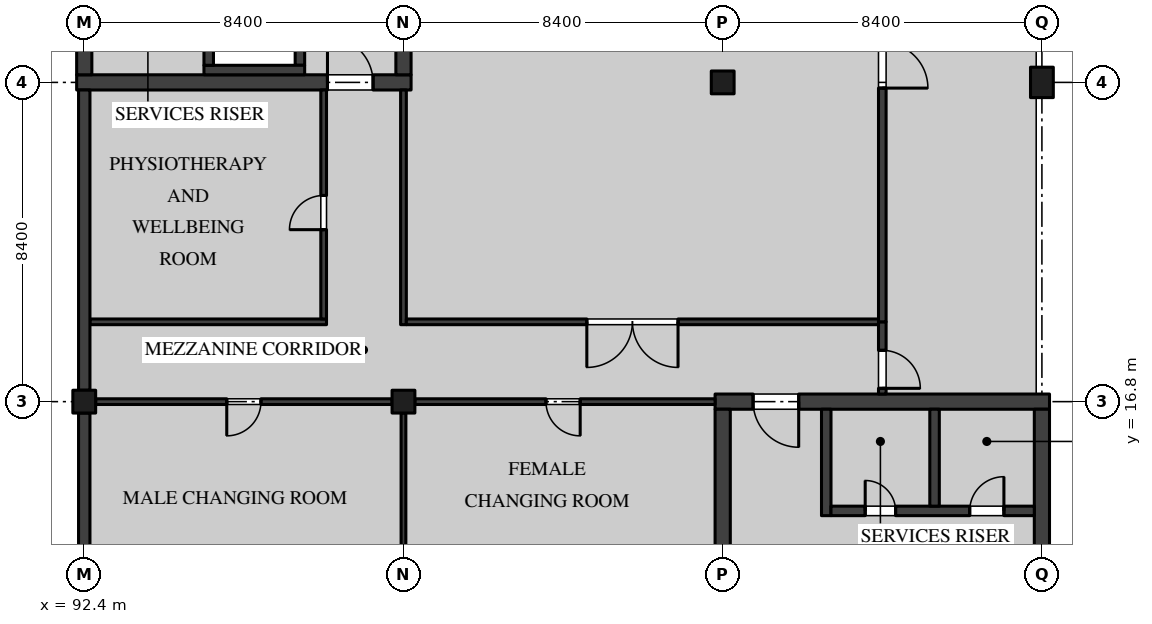
"""IFC4 building model, lengths in metres.
Left out: names, types, materials, properties, quantities, classifications, styles, units other than length and angle.
Written with IfcOpenShell. Run it as: python <this file> out.ifc"""

import sys

from ifc_helpers import new_model, si_unit, direction, frame, frame_2d, origin, origin_2d, place, context, subcontext, project, spatial, rectangle, extrude, element, fill, save


model = new_model("IFC4")
c1 = context("Model", 3, precision=1e-05, world=origin(), true_north=direction((0.0, 1.0)))
c2 = subcontext(c1, "Body", "Model", "MODEL_VIEW")
j1 = project(units=[si_unit("LENGTHUNIT", "METRE"), si_unit("PLANEANGLEUNIT", "RADIAN")], contexts=[c1])
p1 = place(None, origin())
s1 = spatial("IfcSite", under=j1, at=p1, CompositionType="ELEMENT")
p2 = place(p1, origin())
s2 = spatial("IfcBuilding", under=s1, at=p2, CompositionType="ELEMENT")
p3 = place(p2, frame((0.0, 0.0, 5.4)))
s3 = spatial("IfcBuildingStorey", under=s2, at=p3, CompositionType="ELEMENT", Elevation=5.4)
for number, where, z_axis, x_axis in (
    (1, (92.4, 16.8, 0.0), (0.0, 0.0, 1.0), (1.0, 0.0, 0.0)),
    (2, (100.8, 16.8, 0.0), (0.0, 0.0, 1.0), (1.0, 0.0, 0.0)),
    (3, (109.2, 25.2, 0.0), (0.0, 0.0, 1.0), (1.0, 0.0, 0.0)),
):
    element("IfcColumn", number, at=place(p3, frame(where, z_axis=z_axis, x_axis=x_axis)), inside=s3, PredefinedType="COLUMN", context=c2, shape_type="SweptSolid", body=[
        extrude(rectangle(XDim=0.6, YDim=0.6, at=origin_2d()), origin(), (0.0, 0.0, 1.0), 3.0),
    ])
p4 = place(p3, frame((117.6, 25.2, 0.0), z_axis=(0.0, 0.0, 1.0), x_axis=(1.0, 0.0, 0.0)))
e4 = element("IfcColumn", 4, at=p4, inside=s3, PredefinedType="COLUMN", context=c2, shape_type="SweptSolid", body=[
    extrude(rectangle(XDim=0.6, YDim=0.8, at=origin_2d()), origin(), (0.0, 0.0, 1.0), 3.0),
])
p5 = place(p3, frame((92.2, 25.2, 0.0), z_axis=(0.0, 0.0, 1.0), x_axis=(1.0, 0.0, 0.0)))
e5 = element("IfcWall", 5, at=p5, inside=s3, PredefinedType="SHEAR", context=c2, shape_type="SweptSolid", body=[
    extrude(rectangle(XDim=8.8, YDim=0.4, at=frame_2d((4.4, 0.0))), origin(), (0.0, 0.0, 1.0), 3.0),
])
p6 = place(p5, frame((6.6, 0.0, 0.0)))
e6 = element("IfcOpeningElement", 6, at=p6, cuts=e5, PredefinedType="OPENING", context=c2, shape_type="SweptSolid", body=[
    extrude(rectangle(XDim=1.2, YDim=2.1, at=frame_2d((0.6, 1.05))), frame((0.0, 0.21, 0.0), z_axis=(0.0, -1.0, 0.0), x_axis=(1.0, 0.0, 0.0)), (0.0, 0.0, 1.0), 0.42),
])
for number, where, z_axis, x_axis in (
    (7, (92.4, 25.4, 0.0), (0.0, 0.0, 1.0), (0.0, 1.0, 0.0)),
    (8, (100.8, 25.4, 0.0), (0.0, 0.0, 1.0), (0.0, 1.0, 0.0)),
):
    element("IfcWall", number, at=place(p3, frame(where, z_axis=z_axis, x_axis=x_axis)), inside=s3, PredefinedType="SHEAR", context=c2, shape_type="SweptSolid", body=[
        extrude(rectangle(XDim=8.0, YDim=0.4, at=frame_2d((4.0, 0.0))), origin(), (0.0, 0.0, 1.0), 3.0),
    ])
p7 = place(p3, frame((109.0, 16.8, 0.0), z_axis=(0.0, 0.0, 1.0), x_axis=(1.0, 0.0, 0.0)))
e9 = element("IfcWall", 9, at=p7, inside=s3, PredefinedType="SHEAR", context=c2, shape_type="SweptSolid", body=[
    extrude(rectangle(XDim=8.8, YDim=0.4, at=frame_2d((4.4, 0.0))), origin(), (0.0, 0.0, 1.0), 3.0),
])
p8 = place(p7, frame((1.0, 0.0, 0.0)))
e10 = element("IfcOpeningElement", 10, at=p8, cuts=e9, PredefinedType="OPENING", context=c2, shape_type="SweptSolid", body=[
    extrude(rectangle(XDim=1.2, YDim=2.1, at=frame_2d((0.6, 1.05))), frame((0.0, 0.21, 0.0), z_axis=(0.0, -1.0, 0.0), x_axis=(1.0, 0.0, 0.0)), (0.0, 0.0, 1.0), 0.42),
])
for number, where, z_axis, x_axis in (
    (11, (109.2, 8.6, 0.0), (0.0, 0.0, 1.0), (0.0, 1.0, 0.0)),
    (12, (117.6, 8.6, 0.0), (0.0, 0.0, 1.0), (0.0, 1.0, 0.0)),
):
    element("IfcWall", number, at=place(p3, frame(where, z_axis=z_axis, x_axis=x_axis)), inside=s3, PredefinedType="SHEAR", context=c2, shape_type="SweptSolid", body=[
        extrude(rectangle(XDim=8.0, YDim=0.4, at=frame_2d((4.0, 0.0))), origin(), (0.0, 0.0, 1.0), 3.0),
    ])
p9 = place(p3, frame((111.925, 13.8, 0.0), z_axis=(0.0, 0.0, 1.0), x_axis=(0.0, 1.0, 0.0)))
e13 = element("IfcWall", 13, at=p9, inside=s3, PredefinedType="SOLIDWALL", context=c2, shape_type="SweptSolid", body=[
    extrude(rectangle(XDim=2.8, YDim=0.25, at=frame_2d((1.4, 0.0))), origin(), (0.0, 0.0, 1.0), 3.0),
])
p10 = place(p3, frame((112.05, 13.925, 0.0), z_axis=(0.0, 0.0, 1.0), x_axis=(1.0, 0.0, 0.0)))
e14 = element("IfcWall", 14, at=p10, inside=s3, PredefinedType="SOLIDWALL", context=c2, shape_type="SweptSolid", body=[
    extrude(rectangle(XDim=5.35, YDim=0.25, at=frame_2d((2.675, 0.0))), origin(), (0.0, 0.0, 1.0), 3.0),
])
p11 = place(p10, frame((3.65, 0.0, 0.0)))
e15 = element("IfcOpeningElement", 15, at=p11, cuts=e14, PredefinedType="OPENING", context=c2, shape_type="SweptSolid", body=[
    extrude(rectangle(XDim=0.9, YDim=2.1, at=frame_2d((0.45, 1.05))), frame((0.0, 0.135, 0.0), z_axis=(0.0, -1.0, 0.0), x_axis=(1.0, 0.0, 0.0)), (0.0, 0.0, 1.0), 0.27),
])
p12 = place(p10, frame((0.9, 0.0, 0.0)))
e16 = element("IfcOpeningElement", 16, at=p12, cuts=e14, PredefinedType="OPENING", context=c2, shape_type="SweptSolid", body=[
    extrude(rectangle(XDim=0.8, YDim=2.1, at=frame_2d((0.4, 1.05))), frame((0.0, 0.135, 0.0), z_axis=(0.0, -1.0, 0.0), x_axis=(1.0, 0.0, 0.0)), (0.0, 0.0, 1.0), 0.27),
])
p13 = place(p3, frame((114.775, 14.05, 0.0), z_axis=(0.0, 0.0, 1.0), x_axis=(0.0, 1.0, 0.0)))
e17 = element("IfcWall", 17, at=p13, inside=s3, PredefinedType="SOLIDWALL", context=c2, shape_type="SweptSolid", body=[
    extrude(rectangle(XDim=2.55, YDim=0.25, at=frame_2d((1.275, 0.0))), origin(), (0.0, 0.0, 1.0), 3.0),
])
p14 = place(p3, frame((98.075, 25.65, 0.0), z_axis=(0.0, 0.0, 1.0), x_axis=(0.0, 1.0, 0.0)))
e18 = element("IfcWall", 18, at=p14, inside=s3, PredefinedType="SOLIDWALL", context=c2, shape_type="SweptSolid", body=[
    extrude(rectangle(XDim=2.3, YDim=0.25, at=frame_2d((1.15, 0.0))), origin(), (0.0, 0.0, 1.0), 3.0),
])
p15 = place(p3, frame((95.55, 25.525, 0.0), z_axis=(0.0, 0.0, 1.0), x_axis=(1.0, 0.0, 0.0)))
e19 = element("IfcWall", 19, at=p15, inside=s3, PredefinedType="SOLIDWALL", context=c2, shape_type="SweptSolid", body=[
    extrude(rectangle(XDim=2.65, YDim=0.25, at=frame_2d((1.325, 0.0))), origin(), (0.0, 0.0, 1.0), 3.0),
])
p16 = place(p3, frame((95.675, 25.65, 0.0), z_axis=(0.0, 0.0, 1.0), x_axis=(0.0, 1.0, 0.0)))
e20 = element("IfcWall", 20, at=p16, inside=s3, PredefinedType="SOLIDWALL", context=c2, shape_type="SweptSolid", body=[
    extrude(rectangle(XDim=2.3, YDim=0.25, at=frame_2d((1.15, 0.0))), origin(), (0.0, 0.0, 1.0), 3.0),
])
p17 = place(p2, origin())
s4 = spatial("IfcBuildingStorey", under=s2, at=p17, CompositionType="ELEMENT", Elevation=0.0)
p18 = place(p17, frame((117.6, 17.0, 0.0), z_axis=(0.0, 0.0, 1.0), x_axis=(0.0, 1.0, 0.0)))
e21 = element("IfcWall", 21, at=p18, inside=s4, PredefinedType="PARTITIONING", context=c2, shape_type="SweptSolid", body=[
    extrude(rectangle(XDim=1.9, YDim=0.15, at=frame_2d((0.95, 0.0))), origin(), (0.0, 0.0, 1.0), 8.375),
])
p19 = place(p18, frame((0.45, 0.0, 0.0)))
e22 = element("IfcOpeningElement", 22, at=p19, cuts=e21, PredefinedType="OPENING", context=c2, shape_type="SweptSolid", body=[
    extrude(rectangle(XDim=1.0, YDim=2.1, at=frame_2d((0.5, 1.05))), frame((0.0, 0.085, 0.0), z_axis=(0.0, -1.0, 0.0), x_axis=(1.0, 0.0, 0.0)), (0.0, 0.0, 1.0), 0.17),
])
p20 = place(p17, frame((117.6, 18.9, 0.0), z_axis=(0.0, 0.0, 1.0), x_axis=(0.0, 1.0, 0.0)))
e23 = element("IfcWall", 23, at=p20, inside=s4, PredefinedType="PARTITIONING", context=c2, shape_type="SweptSolid", body=[
    extrude(rectangle(XDim=5.85, YDim=0.25, at=frame_2d((2.925, 0.0))), origin(), (0.0, 0.0, 1.0), 8.375),
])
p21 = place(p17, frame((117.6, 25.65, 0.0), z_axis=(0.0, 0.0, 1.0), x_axis=(0.0, 1.0, 0.0)))
e24 = element("IfcWall", 24, at=p21, inside=s4, PredefinedType="PARTITIONING", context=c2, shape_type="SweptSolid", body=[
    extrude(rectangle(XDim=7.75, YDim=0.25, at=frame_2d((3.875, 0.0))), origin(), (0.0, 0.0, 1.0), 8.375),
])
p22 = place(p3, frame((113.4, 17.0, 0.0), z_axis=(0.0, 0.0, 1.0), x_axis=(0.0, 1.0, 0.0)))
e25 = element("IfcWall", 25, at=p22, inside=s3, PredefinedType="PARTITIONING", context=c2, shape_type="SweptSolid", body=[
    extrude(rectangle(XDim=1.9, YDim=0.2, at=frame_2d((0.95, 0.0))), origin(), (0.0, 0.0, 1.0), 4.37),
])
p23 = place(p22, frame((0.15, 0.0, 0.0)))
e26 = element("IfcOpeningElement", 26, at=p23, cuts=e25, PredefinedType="OPENING", context=c2, shape_type="SweptSolid", body=[
    extrude(rectangle(XDim=1.0, YDim=2.4, at=frame_2d((0.5, 1.2))), frame((0.0, 0.11, 0.0), z_axis=(0.0, -1.0, 0.0), x_axis=(1.0, 0.0, 0.0)), (0.0, 0.0, 1.0), 0.22),
])
p24 = place(p3, frame((113.4, 18.9, 0.0), z_axis=(0.0, 0.0, 1.0), x_axis=(0.0, 1.0, 0.0)))
e27 = element("IfcWall", 27, at=p24, inside=s3, PredefinedType="PARTITIONING", context=c2, shape_type="SweptSolid", body=[
    extrude(rectangle(XDim=14.5, YDim=0.2, at=frame_2d((7.25, 0.0))), origin(), (0.0, 0.0, 1.0), 4.37),
])
p25 = place(p24, frame((6.15, 0.0, 0.0)))
e28 = element("IfcOpeningElement", 28, at=p25, cuts=e27, PredefinedType="OPENING", context=c2, shape_type="SweptSolid", body=[
    extrude(rectangle(XDim=2.4, YDim=2.7, at=frame_2d((1.2, 1.35))), frame((0.0, 0.11, 0.0), z_axis=(0.0, -1.0, 0.0), x_axis=(1.0, 0.0, 0.0)), (0.0, 0.0, 1.0), 0.22),
])
p26 = place(p3, frame((100.8, 18.825, 0.0), z_axis=(0.0, 0.0, 1.0), x_axis=(0.0, 1.0, 0.0)))
e29 = element("IfcWall", 29, at=p26, inside=s3, PredefinedType="PARTITIONING", context=c2, shape_type="SweptSolid", body=[
    extrude(rectangle(XDim=6.175, YDim=0.15, at=frame_2d((3.087, 0.0))), origin(), (0.0, 0.0, 1.0), 2.975),
])
p27 = place(p3, frame((100.875, 18.9, 0.0), z_axis=(0.0, 0.0, 1.0), x_axis=(1.0, 0.0, 0.0)))
e30 = element("IfcWall", 30, at=p27, inside=s3, PredefinedType="PARTITIONING", context=c2, shape_type="SweptSolid", body=[
    extrude(rectangle(XDim=12.425, YDim=0.15, at=frame_2d((6.212, 0.0))), origin(), (0.0, 0.0, 1.0), 4.37),
])
p28 = place(p27, frame((4.75, 0.0, 0.0)))
e31 = element("IfcOpeningElement", 31, at=p28, cuts=e30, PredefinedType="OPENING", context=c2, shape_type="SweptSolid", body=[
    extrude(rectangle(XDim=2.4, YDim=2.7, at=frame_2d((1.2, 1.35))), frame((0.0, 0.085, 0.0), z_axis=(0.0, -1.0, 0.0), x_axis=(1.0, 0.0, 0.0)), (0.0, 0.0, 1.0), 0.17),
])
p29 = place(p3, frame((101.1, 16.8, 0.0), z_axis=(0.0, 0.0, 1.0), x_axis=(1.0, 0.0, 0.0)))
e32 = element("IfcWall", 32, at=p29, inside=s3, PredefinedType="PARTITIONING", context=c2, shape_type="SweptSolid", body=[
    extrude(rectangle(XDim=7.9, YDim=0.15, at=frame_2d((3.95, 0.0))), origin(), (0.0, 0.0, 1.0), 4.37),
])
p30 = place(p29, frame((3.45, 0.0, 0.0)))
e33 = element("IfcOpeningElement", 33, at=p30, cuts=e32, PredefinedType="OPENING", context=c2, shape_type="SweptSolid", body=[
    extrude(rectangle(XDim=0.9, YDim=2.1, at=frame_2d((0.45, 1.05))), frame((0.0, 0.085, 0.0), z_axis=(0.0, -1.0, 0.0), x_axis=(1.0, 0.0, 0.0)), (0.0, 0.0, 1.0), 0.17),
])
p31 = place(p3, frame((92.7, 16.8, 0.0), z_axis=(0.0, 0.0, 1.0), x_axis=(1.0, 0.0, 0.0)))
e34 = element("IfcWall", 34, at=p31, inside=s3, PredefinedType="PARTITIONING", context=c2, shape_type="SweptSolid", body=[
    extrude(rectangle(XDim=7.8, YDim=0.15, at=frame_2d((3.9, 0.0))), origin(), (0.0, 0.0, 1.0), 4.37),
])
p32 = place(p31, frame((3.45, 0.0, 0.0)))
e35 = element("IfcOpeningElement", 35, at=p32, cuts=e34, PredefinedType="OPENING", context=c2, shape_type="SweptSolid", body=[
    extrude(rectangle(XDim=0.9, YDim=2.1, at=frame_2d((0.45, 1.05))), frame((0.0, 0.085, 0.0), z_axis=(0.0, -1.0, 0.0), x_axis=(1.0, 0.0, 0.0)), (0.0, 0.0, 1.0), 0.17),
])
p33 = place(p3, frame((92.55, 18.9, 0.0), z_axis=(0.0, 0.0, 1.0), x_axis=(1.0, 0.0, 0.0)))
e36 = element("IfcWall", 36, at=p33, inside=s3, PredefinedType="PARTITIONING", context=c2, shape_type="SweptSolid", body=[
    extrude(rectangle(XDim=6.225, YDim=0.15, at=frame_2d((3.112, 0.0))), origin(), (0.0, 0.0, 1.0), 4.37),
])
p34 = place(p3, frame((98.7, 18.975, 0.0), z_axis=(0.0, 0.0, 1.0), x_axis=(0.0, 1.0, 0.0)))
e37 = element("IfcWall", 37, at=p34, inside=s3, PredefinedType="PARTITIONING", context=c2, shape_type="SweptSolid", body=[
    extrude(rectangle(XDim=6.025, YDim=0.15, at=frame_2d((3.012, 0.0))), origin(), (0.0, 0.0, 1.0), 4.37),
])
p35 = place(p34, frame((2.35, 0.0, 0.0)))
e38 = element("IfcOpeningElement", 38, at=p35, cuts=e37, PredefinedType="OPENING", context=c2, shape_type="SweptSolid", body=[
    extrude(rectangle(XDim=0.9, YDim=2.1, at=frame_2d((0.45, 1.05))), frame((0.0, 0.085, 0.0), z_axis=(0.0, -1.0, 0.0), x_axis=(1.0, 0.0, 0.0)), (0.0, 0.0, 1.0), 0.17),
])
p36 = place(p3, frame((100.8, 12.662, 0.0), z_axis=(0.0, 0.0, 1.0), x_axis=(0.0, 1.0, 0.0)))
e39 = element("IfcWall", 39, at=p36, inside=s3, PredefinedType="PARTITIONING", context=c2, shape_type="SweptSolid", body=[
    extrude(rectangle(XDim=3.838, YDim=0.125, at=frame_2d((1.919, 0.0))), origin(), (0.0, 0.0, 1.0), 2.975),
])
p37 = place(p3, frame((92.4, 17.1, 3.0), z_axis=(0.0, 0.0, 1.0), x_axis=(0.0, -1.0, 0.0)))
e40 = element("IfcWall", 40, at=p37, inside=s3, PredefinedType="SOLIDWALL", context=c2, shape_type="SweptSolid", body=[
    extrude(rectangle(XDim=0.6, YDim=0.3, at=frame_2d((0.3, 0.0))), origin(), (0.0, 0.0, 1.0), 1.5),
])
p38 = place(p3, frame((92.4, 25.0, 0.0), z_axis=(0.0, 0.0, 1.0), x_axis=(0.0, -1.0, 0.0)))
e41 = element("IfcWall", 41, at=p38, inside=s3, PredefinedType="SOLIDWALL", context=c2, shape_type="SweptSolid", body=[
    extrude(rectangle(XDim=7.9, YDim=0.3, at=frame_2d((3.95, 0.0))), origin(), (0.0, 0.0, 1.0), 2.975),
])
p39 = place(p3, frame((92.4, 16.5, 0.0), z_axis=(0.0, 0.0, 1.0), x_axis=(0.0, -1.0, 0.0)))
e42 = element("IfcWall", 42, at=p39, inside=s3, PredefinedType="SOLIDWALL", context=c2, shape_type="SweptSolid", body=[
    extrude(rectangle(XDim=7.8, YDim=0.3, at=frame_2d((3.9, 0.0))), origin(), (0.0, 0.0, 1.0), 2.975),
])
p40 = place(p6, origin())
e43 = element("IfcDoor", 43, at=p40, inside=s3, OperationType="SINGLE_SWING_RIGHT", PredefinedType="DOOR", context=c2, shape_type="SweptSolid", body=[
    extrude(rectangle(XDim=1.2, YDim=2.1, at=frame_2d((0.6, 1.05))), frame((0.0, 0.035, 0.0), z_axis=(0.0, -1.0, 0.0), x_axis=(1.0, 0.0, 0.0)), (0.0, 0.0, 1.0), 0.07),
])
fill(e6, e43)
p41 = place(p11, origin())
e44 = element("IfcDoor", 44, at=p41, inside=s3, OperationType="SINGLE_SWING_LEFT", PredefinedType="DOOR", context=c2, shape_type="SweptSolid", body=[
    extrude(rectangle(XDim=0.9, YDim=2.1, at=frame_2d((0.45, 1.05))), frame((0.0, 0.035, 0.0), z_axis=(0.0, -1.0, 0.0), x_axis=(1.0, 0.0, 0.0)), (0.0, 0.0, 1.0), 0.07),
])
fill(e15, e44)
p42 = place(p8, frame((1.2, 0.0, 0.0), z_axis=(0.0, 0.0, 1.0), x_axis=(-1.0, 0.0, 0.0)))
e45 = element("IfcDoor", 45, at=p42, inside=s3, OperationType="SINGLE_SWING_RIGHT", PredefinedType="DOOR", context=c2, shape_type="SweptSolid", body=[
    extrude(rectangle(XDim=1.2, YDim=2.1, at=frame_2d((0.6, 1.05))), frame((0.0, 0.035, 0.0), z_axis=(0.0, -1.0, 0.0), x_axis=(1.0, 0.0, 0.0)), (0.0, 0.0, 1.0), 0.07),
])
fill(e10, e45)
p43 = place(p12, origin())
e46 = element("IfcDoor", 46, at=p43, inside=s3, OperationType="SINGLE_SWING_RIGHT", PredefinedType="DOOR", context=c2, shape_type="SweptSolid", body=[
    extrude(rectangle(XDim=0.8, YDim=2.1, at=frame_2d((0.4, 1.05))), frame((0.0, 0.035, 0.0), z_axis=(0.0, -1.0, 0.0), x_axis=(1.0, 0.0, 0.0)), (0.0, 0.0, 1.0), 0.07),
])
fill(e16, e46)
p44 = place(p23, frame((1.0, 0.0, 0.0), z_axis=(0.0, 0.0, 1.0), x_axis=(-1.0, 0.0, 0.0)))
e47 = element("IfcDoor", 47, at=p44, inside=s3, OperationType="SINGLE_SWING_LEFT", PredefinedType="DOOR", context=c2, shape_type="SweptSolid", body=[
    extrude(rectangle(XDim=1.0, YDim=2.4, at=frame_2d((0.5, 1.2))), frame((0.0, 0.03, 0.0), z_axis=(0.0, -1.0, 0.0), x_axis=(1.0, 0.0, 0.0)), (0.0, 0.0, 1.0), 0.06),
])
fill(e26, e47)
p45 = place(p25, frame((2.4, 0.0, 0.0), z_axis=(0.0, 0.0, 1.0), x_axis=(-1.0, 0.0, 0.0)))
e48 = element("IfcDoor", 48, at=p45, inside=s3, OperationType="DOUBLE_DOOR_SINGLE_SWING", PredefinedType="DOOR", context=c2, shape_type="SweptSolid", body=[
    extrude(rectangle(XDim=2.4, YDim=2.7, at=frame_2d((1.2, 1.35))), frame((0.0, 0.03, 0.0), z_axis=(0.0, -1.0, 0.0), x_axis=(1.0, 0.0, 0.0)), (0.0, 0.0, 1.0), 0.06),
])
fill(e28, e48)
p46 = place(p28, frame((2.4, 0.0, 0.0), z_axis=(0.0, 0.0, 1.0), x_axis=(-1.0, 0.0, 0.0)))
e49 = element("IfcDoor", 49, at=p46, inside=s3, OperationType="DOUBLE_DOOR_SINGLE_SWING", PredefinedType="DOOR", context=c2, shape_type="SweptSolid", body=[
    extrude(rectangle(XDim=2.4, YDim=2.7, at=frame_2d((1.2, 1.35))), frame((0.0, 0.025, 0.0), z_axis=(0.0, -1.0, 0.0), x_axis=(1.0, 0.0, 0.0)), (0.0, 0.0, 1.0), 0.05),
])
fill(e31, e49)
p47 = place(p30, frame((0.9, 0.0, 0.0), z_axis=(0.0, 0.0, 1.0), x_axis=(-1.0, 0.0, 0.0)))
e50 = element("IfcDoor", 50, at=p47, inside=s3, OperationType="SINGLE_SWING_RIGHT", PredefinedType="DOOR", context=c2, shape_type="SweptSolid", body=[
    extrude(rectangle(XDim=0.9, YDim=2.1, at=frame_2d((0.45, 1.05))), frame((0.0, 0.025, 0.0), z_axis=(0.0, -1.0, 0.0), x_axis=(1.0, 0.0, 0.0)), (0.0, 0.0, 1.0), 0.05),
])
fill(e33, e50)
p48 = place(p32, frame((0.9, 0.0, 0.0), z_axis=(0.0, 0.0, 1.0), x_axis=(-1.0, 0.0, 0.0)))
e51 = element("IfcDoor", 51, at=p48, inside=s3, OperationType="SINGLE_SWING_LEFT", PredefinedType="DOOR", context=c2, shape_type="SweptSolid", body=[
    extrude(rectangle(XDim=0.9, YDim=2.1, at=frame_2d((0.45, 1.05))), frame((0.0, 0.025, 0.0), z_axis=(0.0, -1.0, 0.0), x_axis=(1.0, 0.0, 0.0)), (0.0, 0.0, 1.0), 0.05),
])
fill(e35, e51)
p49 = place(p35, origin())
e52 = element("IfcDoor", 52, at=p49, inside=s3, OperationType="SINGLE_SWING_RIGHT", PredefinedType="DOOR", context=c2, shape_type="SweptSolid", body=[
    extrude(rectangle(XDim=0.9, YDim=2.1, at=frame_2d((0.45, 1.05))), frame((0.0, 0.025, 0.0), z_axis=(0.0, -1.0, 0.0), x_axis=(1.0, 0.0, 0.0)), (0.0, 0.0, 1.0), 0.05),
])
fill(e38, e52)
save(model, sys.argv[1])
